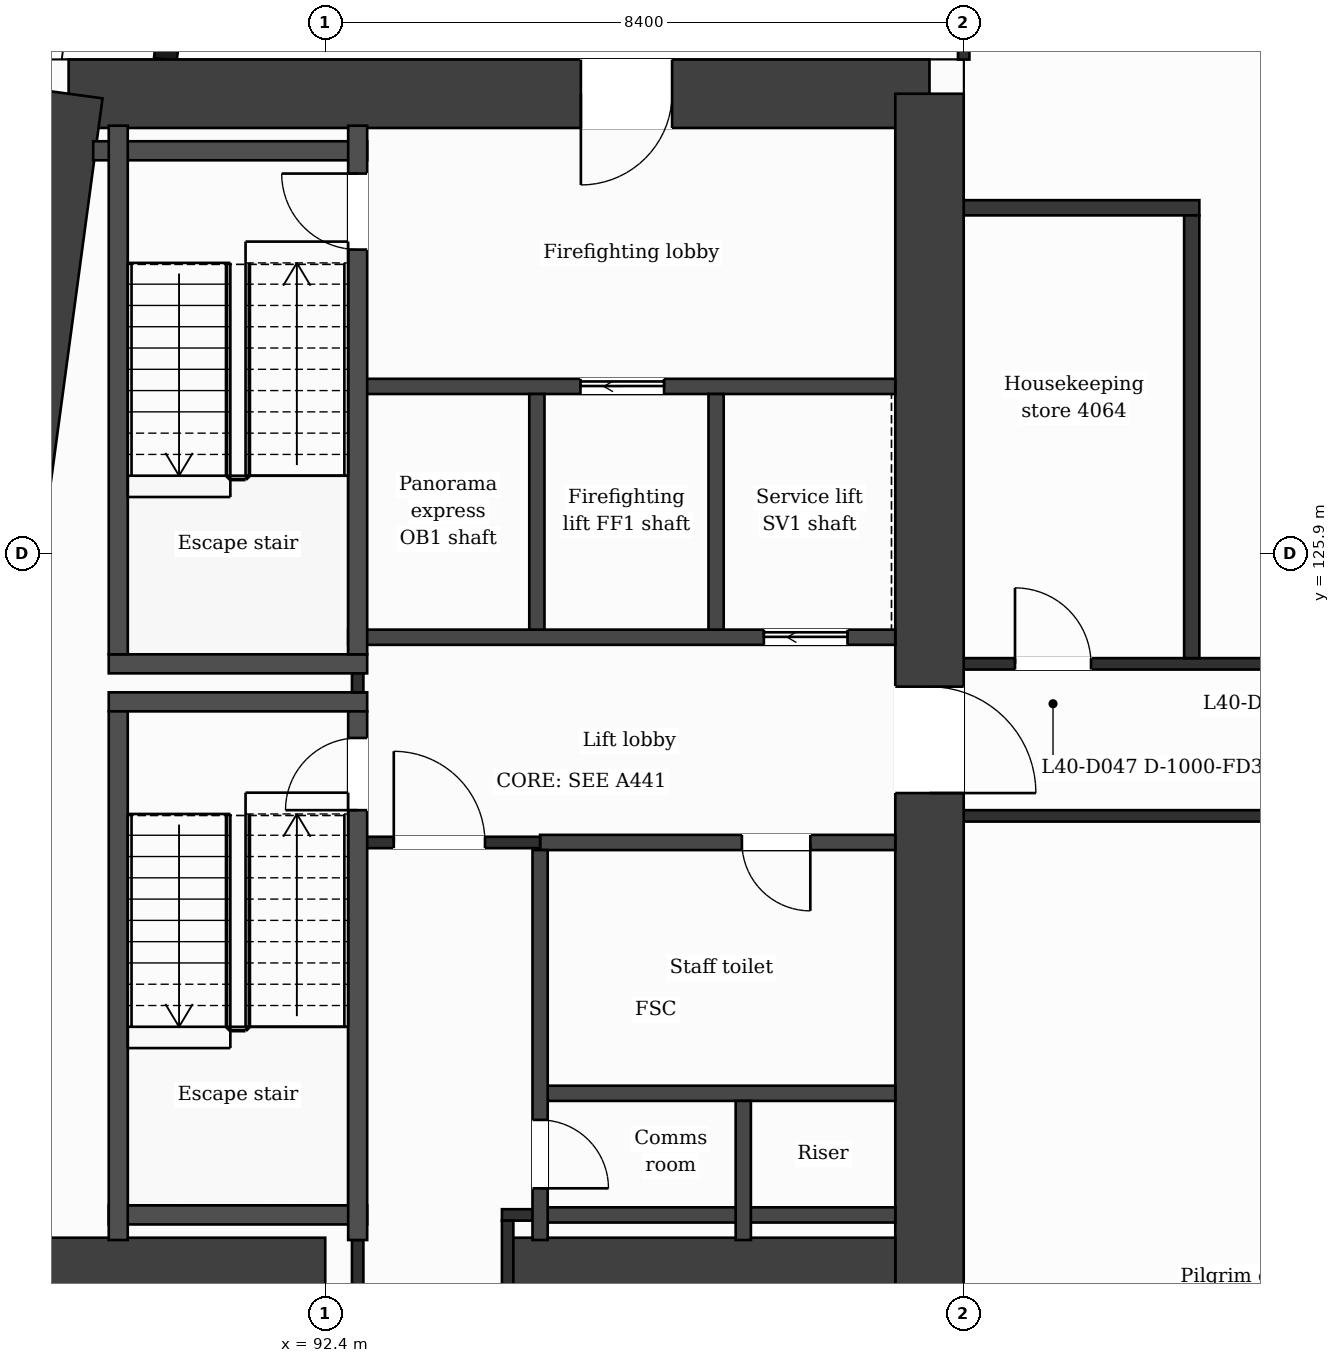
"""IFC4 building model, lengths in metres.
Left out: names, types, materials, properties, quantities, classifications, styles, units other than length and angle.
Written with IfcOpenShell. Run it as: python <this file> out.ifc"""

import sys

from ifc_helpers import new_model, si_unit, direction, frame, frame_2d, origin, place, context, subcontext, project, spatial, rectangle, extrude, element, fill, save


model = new_model("IFC4")
c1 = context("Model", 3, precision=1e-05, world=origin(), true_north=direction((0.0, 1.0)))
c2 = subcontext(c1, "Body", "Model", "MODEL_VIEW")
j1 = project(units=[si_unit("LENGTHUNIT", "METRE"), si_unit("PLANEANGLEUNIT", "RADIAN")], contexts=[c1])
p1 = place(None, origin())
s1 = spatial("IfcSite", under=j1, at=p1, CompositionType="ELEMENT")
p2 = place(p1, origin())
s2 = spatial("IfcBuilding", under=s1, at=p2, CompositionType="ELEMENT")
p3 = place(p2, frame((0.0, 0.0, 170.0)))
s3 = spatial("IfcBuildingStorey", under=s2, at=p3, CompositionType="ELEMENT", Elevation=170.0)
p4 = place(p3, frame((89.024, 131.95, 0.0), z_axis=(0.0, 0.0, 1.0), x_axis=(1.0, 0.0, 0.0)))
e1 = element("IfcWall", 1, at=p4, inside=s3, PredefinedType="SHEAR", context=c2, shape_type="SweptSolid", body=[
    extrude(rectangle(XDim=11.326, YDim=0.9, at=frame_2d((5.663, 0.0))), origin(), (0.0, 0.0, 1.0), 3.7),
])
p5 = place(p4, frame((6.739, 0.0, 0.0)))
e2 = element("IfcOpeningElement", 2, at=p5, cuts=e1, PredefinedType="OPENING", context=c2, shape_type="SweptSolid", body=[
    extrude(rectangle(XDim=1.2, YDim=2.1, at=frame_2d((0.6, 1.05))), frame((0.0, 0.46, 0.0), z_axis=(0.0, -1.0, 0.0), x_axis=(1.0, 0.0, 0.0)), (0.0, 0.0, 1.0), 0.92),
])
p6 = place(p3, frame((100.35, 131.95, 0.0), z_axis=(0.0, 0.0, 1.0), x_axis=(0.0, -1.0, 0.0)))
e3 = element("IfcWall", 3, at=p6, inside=s3, PredefinedType="SHEAR", context=c2, shape_type="SweptSolid", body=[
    extrude(rectangle(XDim=21.1, YDim=0.9, at=frame_2d((10.55, 0.0))), origin(), (0.0, 0.0, 1.0), 3.7),
])
p7 = place(p6, frame((7.8, 0.0, 0.0)))
e4 = element("IfcOpeningElement", 4, at=p7, cuts=e3, PredefinedType="OPENING", context=c2, shape_type="SweptSolid", body=[
    extrude(rectangle(XDim=1.4, YDim=2.1, at=frame_2d((0.7, 1.05))), frame((0.0, 0.46, 0.0), z_axis=(0.0, -1.0, 0.0), x_axis=(1.0, 0.0, 0.0)), (0.0, 0.0, 1.0), 0.92),
])
p8 = place(p3, frame((86.184, 110.85, 0.0), z_axis=(0.0, 0.0, 1.0), x_axis=(0.133410495943, 0.991060865725, 0.0)))
e5 = element("IfcWall", 5, at=p8, inside=s3, PredefinedType="SHEAR", context=c2, shape_type="SweptSolid", body=[
    extrude(rectangle(XDim=21.29, YDim=0.9, at=frame_2d((10.645, 0.0))), origin(), (0.0, 0.0, 1.0), 3.7),
])
p9 = place(p3, frame((87.323, 116.45, 0.0), z_axis=(0.0, 0.0, 1.0), x_axis=(1.0, 0.0, 0.0)))
e6 = element("IfcWall", 6, at=p9, inside=s3, PredefinedType="SHEAR", context=c2, shape_type="SweptSolid", body=[
    extrude(rectangle(XDim=5.077, YDim=0.9, at=frame_2d((2.539, 0.0))), origin(), (0.0, 0.0, 1.0), 3.7),
])
p10 = place(p3, frame((94.8, 116.45, 0.0), z_axis=(0.0, 0.0, 1.0), x_axis=(1.0, 0.0, 0.0)))
e7 = element("IfcWall", 7, at=p10, inside=s3, PredefinedType="SHEAR", context=c2, shape_type="SweptSolid", body=[
    extrude(rectangle(XDim=5.1, YDim=0.9, at=frame_2d((2.55, 0.0))), origin(), (0.0, 0.0, 1.0), 3.7),
])
p11 = place(p3, frame((91.177, 138.95, 0.0), z_axis=(0.0, 0.0, 1.0), x_axis=(-0.133426664613, -0.991058689065, 0.0)))
e8 = element("IfcWall", 8, at=p11, inside=s3, PredefinedType="SOLIDWALL", context=c2, shape_type="SweptSolid", body=[
    extrude(rectangle(XDim=6.609, YDim=0.3, at=frame_2d((3.305, 0.0))), origin(), (0.0, 0.0, 1.0), 3.38),
])
p12 = place(p11, frame((1.039, 0.0, 0.9)))
e9 = element("IfcOpeningElement", 9, at=p12, cuts=e8, PredefinedType="OPENING", context=c2, shape_type="SweptSolid", body=[
    extrude(rectangle(XDim=1.2, YDim=2.1, at=frame_2d((0.6, 1.05))), frame((0.0, 0.16, 0.0), z_axis=(0.0, -1.0, 0.0), x_axis=(1.0, 0.0, 0.0)), (0.0, 0.0, 1.0), 0.32),
])
p13 = place(p11, frame((4.294, 0.0, 0.0)))
e10 = element("IfcOpeningElement", 10, at=p13, cuts=e8, PredefinedType="OPENING", context=c2, shape_type="SweptSolid", body=[
    extrude(rectangle(XDim=1.2, YDim=2.4, at=frame_2d((0.6, 1.2))), frame((0.0, 0.16, 0.0), z_axis=(0.0, -1.0, 0.0), x_axis=(1.0, 0.0, 0.0)), (0.0, 0.0, 1.0), 0.32),
])
p14 = place(p3, frame((95.227, 117.2, 0.0), z_axis=(0.0, 0.0, 1.0), x_axis=(1.0, 0.0, 0.0)))
e11 = element("IfcWall", 11, at=p14, inside=s3, PredefinedType="PARTITIONING", context=c2, shape_type="SweptSolid", body=[
    extrude(rectangle(XDim=4.673, YDim=0.2, at=frame_2d((2.336, 0.0))), origin(), (0.0, 0.0, 1.0), 3.38),
])
p15 = place(p3, frame((94.725, 117.2, 0.0), z_axis=(0.0, 0.0, 1.0), x_axis=(1.0, 0.0, 0.0)))
e12 = element("IfcWall", 12, at=p15, inside=s3, PredefinedType="PARTITIONING", context=c2, shape_type="SweptSolid", body=[
    extrude(rectangle(XDim=0.502, YDim=0.15, at=frame_2d((0.251, 0.0))), origin(), (0.0, 0.0, 1.0), 3.38),
])
p16 = place(p3, frame((89.552, 117.2, 0.0), z_axis=(0.0, 0.0, 1.0), x_axis=(1.0, 0.0, 0.0)))
e13 = element("IfcWall", 13, at=p16, inside=s3, PredefinedType="PARTITIONING", context=c2, shape_type="SweptSolid", body=[
    extrude(rectangle(XDim=3.4, YDim=0.25, at=frame_2d((1.7, 0.0))), origin(), (0.0, 0.0, 1.0), 3.38),
])
p17 = place(p3, frame((95.227, 118.8, 0.0), z_axis=(0.0, 0.0, 1.0), x_axis=(1.0, 0.0, 0.0)))
e14 = element("IfcWall", 14, at=p17, inside=s3, PredefinedType="PARTITIONING", context=c2, shape_type="SweptSolid", body=[
    extrude(rectangle(XDim=4.673, YDim=0.2, at=frame_2d((2.336, 0.0))), origin(), (0.0, 0.0, 1.0), 3.38),
])
p18 = place(p3, frame((95.227, 122.1, 0.0), z_axis=(0.0, 0.0, 1.0), x_axis=(1.0, 0.0, 0.0)))
e15 = element("IfcWall", 15, at=p18, inside=s3, PredefinedType="PARTITIONING", context=c2, shape_type="SweptSolid", body=[
    extrude(rectangle(XDim=4.673, YDim=0.2, at=frame_2d((2.336, 0.0))), origin(), (0.0, 0.0, 1.0), 3.38),
])
p19 = place(p18, frame((2.655, 0.0, 0.0)))
e16 = element("IfcOpeningElement", 16, at=p19, cuts=e15, PredefinedType="OPENING", context=c2, shape_type="SweptSolid", body=[
    extrude(rectangle(XDim=0.9, YDim=2.1, at=frame_2d((0.45, 1.05))), frame((0.0, 0.11, 0.0), z_axis=(0.0, -1.0, 0.0), x_axis=(1.0, 0.0, 0.0)), (0.0, 0.0, 1.0), 0.22),
])
p20 = place(p3, frame((92.827, 122.1, 0.0), z_axis=(0.0, 0.0, 1.0), x_axis=(1.0, 0.0, 0.0)))
e17 = element("IfcWall", 17, at=p20, inside=s3, PredefinedType="PARTITIONING", context=c2, shape_type="SweptSolid", body=[
    extrude(rectangle(XDim=2.4, YDim=0.15, at=frame_2d((1.2, 0.0))), origin(), (0.0, 0.0, 1.0), 3.38),
])
p21 = place(p20, frame((0.475, 0.0, 0.0)))
e18 = element("IfcOpeningElement", 18, at=p21, cuts=e17, PredefinedType="OPENING", context=c2, shape_type="SweptSolid", body=[
    extrude(rectangle(XDim=1.2, YDim=2.1, at=frame_2d((0.6, 1.05))), frame((0.0, 0.085, 0.0), z_axis=(0.0, -1.0, 0.0), x_axis=(1.0, 0.0, 0.0)), (0.0, 0.0, 1.0), 0.17),
])
p22 = place(p3, frame((100.8, 122.45, 0.0), z_axis=(0.0, 0.0, 1.0), x_axis=(1.0, 0.0, 0.0)))
e19 = element("IfcWall", 19, at=p22, inside=s3, PredefinedType="PARTITIONING", context=c2, shape_type="SweptSolid", body=[
    extrude(rectangle(XDim=25.2, YDim=0.15, at=frame_2d((12.6, 0.0))), origin(), (0.0, 0.0, 1.0), 3.38),
])
for number, where, z_axis, x_axis in (
    (20, (89.552, 123.95, 0.0), (0.0, 0.0, 1.0), (1.0, 0.0, 0.0)),
    (21, (89.552, 124.45, 0.0), (0.0, 0.0, 1.0), (1.0, 0.0, 0.0)),
):
    element("IfcWall", number, at=place(p3, frame(where, z_axis=z_axis, x_axis=x_axis)), inside=s3, PredefinedType="PARTITIONING", context=c2, shape_type="SweptSolid", body=[
        extrude(rectangle(XDim=3.4, YDim=0.25, at=frame_2d((1.7, 0.0))), origin(), (0.0, 0.0, 1.0), 3.38),
    ])
p23 = place(p3, frame((100.8, 124.45, 0.0), z_axis=(0.0, 0.0, 1.0), x_axis=(1.0, 0.0, 0.0)))
e22 = element("IfcWall", 22, at=p23, inside=s3, PredefinedType="PARTITIONING", context=c2, shape_type="SweptSolid", body=[
    extrude(rectangle(XDim=25.2, YDim=0.15, at=frame_2d((12.6, 0.0))), origin(), (0.0, 0.0, 1.0), 3.38),
])
p24 = place(p23, frame((4.275, 0.0, 0.0)))
e23 = element("IfcOpeningElement", 23, at=p24, cuts=e22, PredefinedType="OPENING", context=c2, shape_type="SweptSolid", body=[
    extrude(rectangle(XDim=1.0, YDim=2.1, at=frame_2d((0.5, 1.05))), frame((0.0, 0.085, 0.0), z_axis=(0.0, -1.0, 0.0), x_axis=(1.0, 0.0, 0.0)), (0.0, 0.0, 1.0), 0.17),
])
p25 = place(p23, frame((0.675, 0.0, 0.0)))
e24 = element("IfcOpeningElement", 24, at=p25, cuts=e22, PredefinedType="OPENING", context=c2, shape_type="SweptSolid", body=[
    extrude(rectangle(XDim=1.0, YDim=2.1, at=frame_2d((0.5, 1.05))), frame((0.0, 0.085, 0.0), z_axis=(0.0, -1.0, 0.0), x_axis=(1.0, 0.0, 0.0)), (0.0, 0.0, 1.0), 0.17),
])
p26 = place(p23, frame((10.425, 0.0, 0.0)))
e25 = element("IfcOpeningElement", 25, at=p26, cuts=e22, PredefinedType="OPENING", context=c2, shape_type="SweptSolid", body=[
    extrude(rectangle(XDim=1.0, YDim=2.1, at=frame_2d((0.5, 1.05))), frame((0.0, 0.085, 0.0), z_axis=(0.0, -1.0, 0.0), x_axis=(1.0, 0.0, 0.0)), (0.0, 0.0, 1.0), 0.17),
])
p27 = place(p23, frame((22.175, 0.0, 0.0)))
e26 = element("IfcOpeningElement", 26, at=p27, cuts=e22, PredefinedType="OPENING", context=c2, shape_type="SweptSolid", body=[
    extrude(rectangle(XDim=1.0, YDim=2.1, at=frame_2d((0.5, 1.05))), frame((0.0, 0.085, 0.0), z_axis=(0.0, -1.0, 0.0), x_axis=(1.0, 0.0, 0.0)), (0.0, 0.0, 1.0), 0.17),
])
p28 = place(p3, frame((92.702, 124.8, 0.0), z_axis=(0.0, 0.0, 1.0), x_axis=(1.0, 0.0, 0.0)))
e27 = element("IfcWall", 27, at=p28, inside=s3, PredefinedType="PARTITIONING", context=c2, shape_type="SweptSolid", body=[
    extrude(rectangle(XDim=7.198, YDim=0.2, at=frame_2d((3.599, 0.0))), origin(), (0.0, 0.0, 1.0), 3.38),
])
p29 = place(p28, frame((5.469, 0.0, 0.0)))
e28 = element("IfcOpeningElement", 28, at=p29, cuts=e27, PredefinedType="OPENING", context=c2, shape_type="SweptSolid", body=[
    extrude(rectangle(XDim=1.1, YDim=2.1, at=frame_2d((0.55, 1.05))), frame((0.0, 0.11, 0.0), z_axis=(0.0, -1.0, 0.0), x_axis=(1.0, 0.0, 0.0)), (0.0, 0.0, 1.0), 0.22),
])
p30 = place(p3, frame((92.827, 128.1, 0.0), z_axis=(0.0, 0.0, 1.0), x_axis=(1.0, 0.0, 0.0)))
e29 = element("IfcWall", 29, at=p30, inside=s3, PredefinedType="PARTITIONING", context=c2, shape_type="SweptSolid", body=[
    extrude(rectangle(XDim=7.073, YDim=0.2, at=frame_2d((3.537, 0.0))), origin(), (0.0, 0.0, 1.0), 3.38),
])
p31 = place(p30, frame((2.931, 0.0, 0.0)))
e30 = element("IfcOpeningElement", 30, at=p31, cuts=e29, PredefinedType="OPENING", context=c2, shape_type="SweptSolid", body=[
    extrude(rectangle(XDim=1.1, YDim=2.1, at=frame_2d((0.55, 1.05))), frame((0.0, 0.11, 0.0), z_axis=(0.0, -1.0, 0.0), x_axis=(1.0, 0.0, 0.0)), (0.0, 0.0, 1.0), 0.22),
])
p32 = place(p3, frame((100.8, 130.45, 0.0), z_axis=(0.0, 0.0, 1.0), x_axis=(1.0, 0.0, 0.0)))
e31 = element("IfcWall", 31, at=p32, inside=s3, PredefinedType="PARTITIONING", context=c2, shape_type="SweptSolid", body=[
    extrude(rectangle(XDim=3.1, YDim=0.2, at=frame_2d((1.55, 0.0))), origin(), (0.0, 0.0, 1.0), 3.38),
])
p33 = place(p3, frame((89.347, 131.2, 0.0), z_axis=(0.0, 0.0, 1.0), x_axis=(1.0, 0.0, 0.0)))
e32 = element("IfcWall", 32, at=p33, inside=s3, PredefinedType="PARTITIONING", context=c2, shape_type="SweptSolid", body=[
    extrude(rectangle(XDim=3.604, YDim=0.25, at=frame_2d((1.802, 0.0))), origin(), (0.0, 0.0, 1.0), 3.38),
])
p34 = place(p3, frame((89.677, 116.87, 0.0), z_axis=(0.0, 0.0, 1.0), x_axis=(0.0, 1.0, 0.0)))
e33 = element("IfcWall", 33, at=p34, inside=s3, PredefinedType="PARTITIONING", context=c2, shape_type="SweptSolid", body=[
    extrude(rectangle(XDim=6.955, YDim=0.25, at=frame_2d((3.478, 0.0))), origin(), (0.0, 0.0, 1.0), 3.38),
])
p35 = place(p3, frame((89.677, 124.575, 0.0), z_axis=(0.0, 0.0, 1.0), x_axis=(0.0, 1.0, 0.0)))
e34 = element("IfcWall", 34, at=p35, inside=s3, PredefinedType="PARTITIONING", context=c2, shape_type="SweptSolid", body=[
    extrude(rectangle(XDim=6.955, YDim=0.25, at=frame_2d((3.478, 0.0))), origin(), (0.0, 0.0, 1.0), 3.38),
])
p36 = place(p3, frame((92.827, 116.0, 0.0), z_axis=(0.0, 0.0, 1.0), x_axis=(0.0, 1.0, 0.0)))
e35 = element("IfcWall", 35, at=p36, inside=s3, PredefinedType="PARTITIONING", context=c2, shape_type="SweptSolid", body=[
    extrude(rectangle(XDim=0.87, YDim=0.15, at=frame_2d((0.435, 0.0))), origin(), (0.0, 0.0, 1.0), 3.38),
])
p37 = place(p3, frame((92.827, 124.075, 0.0), z_axis=(0.0, 0.0, 1.0), x_axis=(0.0, 1.0, 0.0)))
e36 = element("IfcWall", 36, at=p37, inside=s3, PredefinedType="PARTITIONING", context=c2, shape_type="SweptSolid", body=[
    extrude(rectangle(XDim=0.25, YDim=0.15, at=frame_2d((0.125, 0.0))), origin(), (0.0, 0.0, 1.0), 3.38),
])
p38 = place(p3, frame((92.827, 116.87, 0.0), z_axis=(0.0, 0.0, 1.0), x_axis=(0.0, 1.0, 0.0)))
e37 = element("IfcWall", 37, at=p38, inside=s3, PredefinedType="PARTITIONING", context=c2, shape_type="SweptSolid", body=[
    extrude(rectangle(XDim=6.955, YDim=0.25, at=frame_2d((3.478, 0.0))), origin(), (0.0, 0.0, 1.0), 3.38),
])
p39 = place(p38, frame((5.655, 0.0, 0.0)))
e38 = element("IfcOpeningElement", 38, at=p39, cuts=e37, PredefinedType="OPENING", context=c2, shape_type="SweptSolid", body=[
    extrude(rectangle(XDim=0.95, YDim=2.1, at=frame_2d((0.475, 1.05))), frame((0.0, 0.135, 0.0), z_axis=(0.0, -1.0, 0.0), x_axis=(1.0, 0.0, 0.0)), (0.0, 0.0, 1.0), 0.27),
])
p40 = place(p3, frame((92.827, 124.575, 0.0), z_axis=(0.0, 0.0, 1.0), x_axis=(0.0, 1.0, 0.0)))
e39 = element("IfcWall", 39, at=p40, inside=s3, PredefinedType="PARTITIONING", context=c2, shape_type="SweptSolid", body=[
    extrude(rectangle(XDim=6.955, YDim=0.25, at=frame_2d((3.478, 0.0))), origin(), (0.0, 0.0, 1.0), 3.38),
])
p41 = place(p40, frame((5.325, 0.0, 0.0)))
e40 = element("IfcOpeningElement", 40, at=p41, cuts=e39, PredefinedType="OPENING", context=c2, shape_type="SweptSolid", body=[
    extrude(rectangle(XDim=1.0, YDim=2.1, at=frame_2d((0.5, 1.05))), frame((0.0, 0.135, 0.0), z_axis=(0.0, -1.0, 0.0), x_axis=(1.0, 0.0, 0.0)), (0.0, 0.0, 1.0), 0.27),
])
p42 = place(p3, frame((94.8, 116.0, 0.0), z_axis=(0.0, 0.0, 1.0), x_axis=(0.0, 1.0, 0.0)))
e41 = element("IfcWall", 41, at=p42, inside=s3, PredefinedType="PARTITIONING", context=c2, shape_type="SweptSolid", body=[
    extrude(rectangle(XDim=1.125, YDim=0.15, at=frame_2d((0.562, 0.0))), origin(), (0.0, 0.0, 1.0), 3.38),
])
p43 = place(p3, frame((95.185, 124.9, 0.0), z_axis=(0.0, 0.0, 1.0), x_axis=(0.0, 1.0, 0.0)))
e42 = element("IfcWall", 42, at=p43, inside=s3, PredefinedType="PARTITIONING", context=c2, shape_type="SweptSolid", body=[
    extrude(rectangle(XDim=3.1, YDim=0.2, at=frame_2d((1.55, 0.0))), origin(), (0.0, 0.0, 1.0), 3.38),
])
p44 = place(p3, frame((95.227, 116.87, 0.0), z_axis=(0.0, 0.0, 1.0), x_axis=(0.0, 1.0, 0.0)))
e43 = element("IfcWall", 43, at=p44, inside=s3, PredefinedType="PARTITIONING", context=c2, shape_type="SweptSolid", body=[
    extrude(rectangle(XDim=5.13, YDim=0.2, at=frame_2d((2.565, 0.0))), origin(), (0.0, 0.0, 1.0), 3.38),
])
p45 = place(p44, frame((0.68, 0.0, 0.0)))
e44 = element("IfcOpeningElement", 44, at=p45, cuts=e43, PredefinedType="OPENING", context=c2, shape_type="SweptSolid", body=[
    extrude(rectangle(XDim=0.9, YDim=2.1, at=frame_2d((0.45, 1.05))), frame((0.0, 0.11, 0.0), z_axis=(0.0, -1.0, 0.0), x_axis=(1.0, 0.0, 0.0)), (0.0, 0.0, 1.0), 0.22),
])
p46 = place(p3, frame((97.542, 124.9, 0.0), z_axis=(0.0, 0.0, 1.0), x_axis=(0.0, 1.0, 0.0)))
e45 = element("IfcWall", 45, at=p46, inside=s3, PredefinedType="PARTITIONING", context=c2, shape_type="SweptSolid", body=[
    extrude(rectangle(XDim=3.1, YDim=0.2, at=frame_2d((1.55, 0.0))), origin(), (0.0, 0.0, 1.0), 3.38),
])
p47 = place(p3, frame((97.9, 116.87, 0.0), z_axis=(0.0, 0.0, 1.0), x_axis=(0.0, 1.0, 0.0)))
e46 = element("IfcWall", 46, at=p47, inside=s3, PredefinedType="PARTITIONING", context=c2, shape_type="SweptSolid", body=[
    extrude(rectangle(XDim=1.83, YDim=0.2, at=frame_2d((0.915, 0.0))), origin(), (0.0, 0.0, 1.0), 3.38),
])
p48 = place(p3, frame((100.8, 132.4, 0.0), z_axis=(0.0, 0.0, 1.0), x_axis=(0.0, 1.0, 0.0)))
e47 = element("IfcWall", 47, at=p48, inside=s3, PredefinedType="PARTITIONING", context=c2, shape_type="SweptSolid", body=[
    extrude(rectangle(XDim=1.325, YDim=0.15, at=frame_2d((0.663, 0.0))), origin(), (0.0, 0.0, 1.0), 3.38),
])
p49 = place(p3, frame((103.8, 124.525, 0.0), z_axis=(0.0, 0.0, 1.0), x_axis=(0.0, 1.0, 0.0)))
e48 = element("IfcWall", 48, at=p49, inside=s3, PredefinedType="PARTITIONING", context=c2, shape_type="SweptSolid", body=[
    extrude(rectangle(XDim=5.825, YDim=0.2, at=frame_2d((2.913, 0.0))), origin(), (0.0, 0.0, 1.0), 3.38),
])
p50 = place(p21, origin())
e49 = element("IfcDoor", 49, at=p50, inside=s3, OperationType="SINGLE_SWING_LEFT", PredefinedType="DOOR", context=c2, shape_type="SweptSolid", body=[
    extrude(rectangle(XDim=1.2, YDim=2.1, at=frame_2d((0.6, 1.05))), frame((0.0, 0.025, 0.0), z_axis=(0.0, -1.0, 0.0), x_axis=(1.0, 0.0, 0.0)), (0.0, 0.0, 1.0), 0.05),
])
fill(e18, e49)
p51 = place(p31, origin())
e50 = element("IfcDoor", 50, at=p51, inside=s3, OperationType="SLIDING_TO_LEFT", PredefinedType="DOOR", context=c2, shape_type="SweptSolid", body=[
    extrude(rectangle(XDim=1.1, YDim=2.1, at=frame_2d((0.55, 1.05))), frame((0.0, 0.025, 0.0), z_axis=(0.0, -1.0, 0.0), x_axis=(1.0, 0.0, 0.0)), (0.0, 0.0, 1.0), 0.05),
])
fill(e30, e50)
p52 = place(p29, origin())
e51 = element("IfcDoor", 51, at=p52, inside=s3, OperationType="SLIDING_TO_LEFT", PredefinedType="DOOR", context=c2, shape_type="SweptSolid", body=[
    extrude(rectangle(XDim=1.1, YDim=2.1, at=frame_2d((0.55, 1.05))), frame((0.0, 0.025, 0.0), z_axis=(0.0, -1.0, 0.0), x_axis=(1.0, 0.0, 0.0)), (0.0, 0.0, 1.0), 0.05),
])
fill(e28, e51)
p53 = place(p19, origin())
e52 = element("IfcDoor", 52, at=p53, inside=s3, OperationType="SINGLE_SWING_RIGHT", PredefinedType="DOOR", context=c2, shape_type="SweptSolid", body=[
    extrude(rectangle(XDim=0.9, YDim=2.1, at=frame_2d((0.45, 1.05))), frame((0.0, 0.025, 0.0), z_axis=(0.0, -1.0, 0.0), x_axis=(1.0, 0.0, 0.0)), (0.0, 0.0, 1.0), 0.05),
])
fill(e16, e52)
p54 = place(p39, origin())
e53 = element("IfcDoor", 53, at=p54, inside=s3, OperationType="SINGLE_SWING_LEFT", PredefinedType="DOOR", context=c2, shape_type="SweptSolid", body=[
    extrude(rectangle(XDim=0.95, YDim=2.1, at=frame_2d((0.475, 1.05))), frame((0.0, 0.025, 0.0), z_axis=(0.0, -1.0, 0.0), x_axis=(1.0, 0.0, 0.0)), (0.0, 0.0, 1.0), 0.05),
])
fill(e38, e53)
p55 = place(p41, origin())
e54 = element("IfcDoor", 54, at=p55, inside=s3, OperationType="SINGLE_SWING_RIGHT", PredefinedType="DOOR", context=c2, shape_type="SweptSolid", body=[
    extrude(rectangle(XDim=1.0, YDim=2.1, at=frame_2d((0.5, 1.05))), frame((0.0, 0.025, 0.0), z_axis=(0.0, -1.0, 0.0), x_axis=(1.0, 0.0, 0.0)), (0.0, 0.0, 1.0), 0.05),
])
fill(e40, e54)
p56 = place(p45, origin())
e55 = element("IfcDoor", 55, at=p56, inside=s3, OperationType="SINGLE_SWING_LEFT", PredefinedType="DOOR", context=c2, shape_type="SweptSolid", body=[
    extrude(rectangle(XDim=0.9, YDim=2.1, at=frame_2d((0.45, 1.05))), frame((0.0, 0.025, 0.0), z_axis=(0.0, -1.0, 0.0), x_axis=(1.0, 0.0, 0.0)), (0.0, 0.0, 1.0), 0.05),
])
fill(e44, e55)
p57 = place(p25, origin())
e56 = element("IfcDoor", 56, at=p57, inside=s3, OperationType="SINGLE_SWING_LEFT", PredefinedType="DOOR", context=c2, shape_type="SweptSolid", body=[
    extrude(rectangle(XDim=1.0, YDim=2.1, at=frame_2d((0.5, 1.05))), frame((0.0, 0.025, 0.0), z_axis=(0.0, -1.0, 0.0), x_axis=(1.0, 0.0, 0.0)), (0.0, 0.0, 1.0), 0.05),
])
fill(e24, e56)
p58 = place(p5, origin())
e57 = element("IfcDoor", 57, at=p58, inside=s3, OperationType="SINGLE_SWING_LEFT", PredefinedType="DOOR", context=c2, shape_type="SweptSolid", body=[
    extrude(rectangle(XDim=1.2, YDim=2.1, at=frame_2d((0.6, 1.05))), frame((0.0, 0.025, 0.0), z_axis=(0.0, -1.0, 0.0), x_axis=(1.0, 0.0, 0.0)), (0.0, 0.0, 1.0), 0.05),
])
fill(e2, e57)
p59 = place(p7, origin())
e58 = element("IfcDoor", 58, at=p59, inside=s3, OperationType="SINGLE_SWING_RIGHT", PredefinedType="DOOR", context=c2, shape_type="SweptSolid", body=[
    extrude(rectangle(XDim=1.4, YDim=2.1, at=frame_2d((0.7, 1.05))), frame((0.0, 0.025, 0.0), z_axis=(0.0, -1.0, 0.0), x_axis=(1.0, 0.0, 0.0)), (0.0, 0.0, 1.0), 0.05),
])
fill(e4, e58)
save(model, sys.argv[1])
